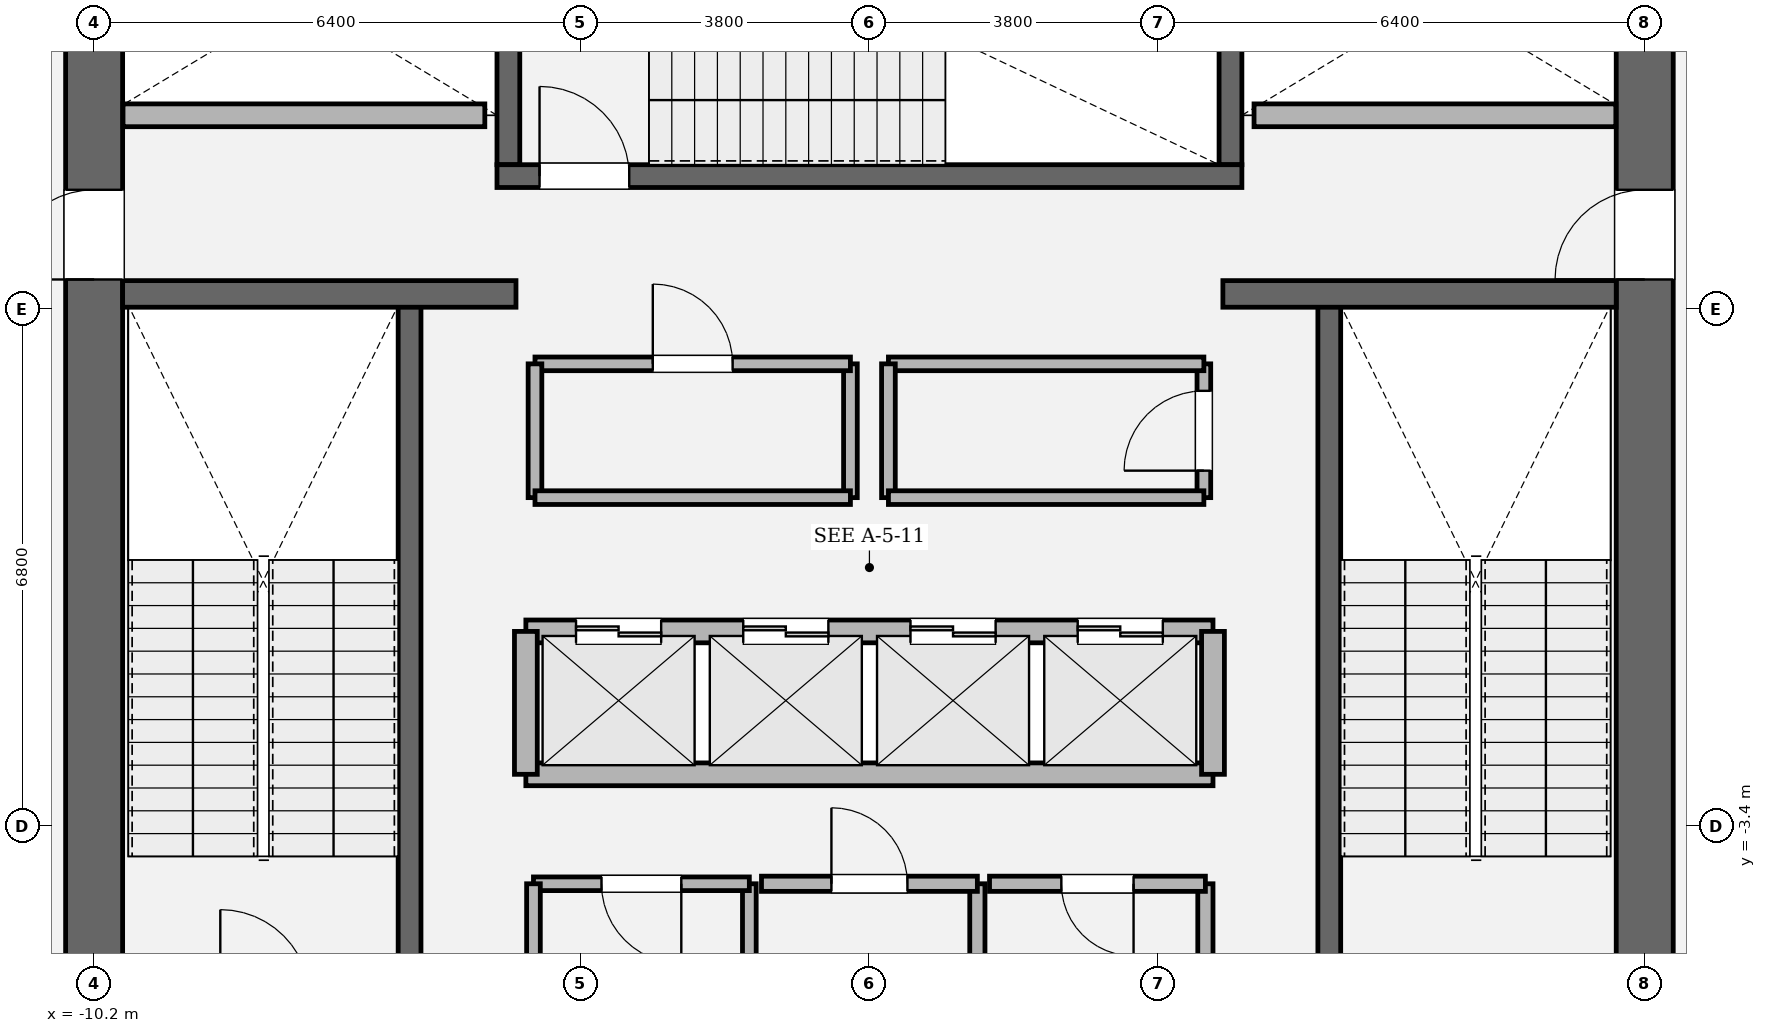
"""IFC4 building model, lengths in metres.
Left out: names, types, materials, properties, quantities, classifications, styles, units other than length and angle.
Written with IfcOpenShell. Run it as: python <this file> out.ifc"""

import sys

from ifc_helpers import new_model, si_unit, direction, frame, frame_2d, origin, place, context, subcontext, project, spatial, rectangle, extrude, element, fill, save


model = new_model("IFC4")
c1 = context("Model", 3, precision=1e-05, world=origin(), true_north=direction((0.0, 1.0)))
c2 = subcontext(c1, "Body", "Model", "MODEL_VIEW")
j1 = project(units=[si_unit("LENGTHUNIT", "METRE"), si_unit("PLANEANGLEUNIT", "RADIAN")], contexts=[c1])
p1 = place(None, origin())
s1 = spatial("IfcSite", under=j1, at=p1, CompositionType="ELEMENT")
p2 = place(p1, origin())
s2 = spatial("IfcBuilding", under=s1, at=p2, CompositionType="ELEMENT")
p3 = place(p2, frame((0.0, 0.0, 48.45)))
s3 = spatial("IfcBuildingStorey", under=s2, at=p3, CompositionType="ELEMENT", Elevation=48.45)
p4 = place(p3, frame((-10.2, -8.825, 0.0), z_axis=(0.0, 0.0, 1.0), x_axis=(0.0, 1.0, 0.0)))
e1 = element("IfcWall", 1, at=p4, inside=s3, PredefinedType="SHEAR", context=c2, shape_type="SweptSolid", body=[
    extrude(rectangle(XDim=17.65, YDim=0.75, at=frame_2d((8.825, 0.0))), origin(), (0.0, 0.0, 1.0), 4.05),
])
p5 = place(p4, frame((12.615, 0.0, 0.0)))
e2 = element("IfcOpeningElement", 2, at=p5, cuts=e1, PredefinedType="OPENING", context=c2, shape_type="SweptSolid", body=[
    extrude(rectangle(XDim=1.18, YDim=2.2, at=frame_2d((0.59, 1.1))), frame((0.0, 0.385, 0.0), z_axis=(0.0, -1.0, 0.0), x_axis=(1.0, 0.0, 0.0)), (0.0, 0.0, 1.0), 0.77),
])
p6 = place(p3, frame((10.2, 8.825, 0.0), z_axis=(0.0, 0.0, 1.0), x_axis=(0.0, -1.0, 0.0)))
e3 = element("IfcWall", 3, at=p6, inside=s3, PredefinedType="SHEAR", context=c2, shape_type="SweptSolid", body=[
    extrude(rectangle(XDim=17.65, YDim=0.75, at=frame_2d((8.825, 0.0))), origin(), (0.0, 0.0, 1.0), 4.05),
])
p7 = place(p6, frame((3.855, 0.0, 0.0)))
e4 = element("IfcOpeningElement", 4, at=p7, cuts=e3, PredefinedType="OPENING", context=c2, shape_type="SweptSolid", body=[
    extrude(rectangle(XDim=1.18, YDim=2.2, at=frame_2d((0.59, 1.1))), frame((0.0, 0.385, 0.0), z_axis=(0.0, -1.0, 0.0), x_axis=(1.0, 0.0, 0.0)), (0.0, 0.0, 1.0), 0.77),
])
for number, where, z_axis, x_axis in (
    (5, (-6.05, -5.5, 0.0), (0.0, 0.0, 1.0), (0.0, 1.0, 0.0)),
    (6, (6.05, 3.45, 0.0), (0.0, 0.0, 1.0), (0.0, -1.0, 0.0)),
):
    element("IfcWall", number, at=place(p3, frame(where, z_axis=z_axis, x_axis=x_axis)), inside=s3, PredefinedType="SOLIDWALL", context=c2, shape_type="SweptSolid", body=[
        extrude(rectangle(XDim=8.95, YDim=0.3, at=frame_2d((4.475, 0.0))), origin(), (0.0, 0.0, 1.0), 4.05),
    ])
for number, where, z_axis, x_axis in (
    (7, (-4.75, 5.3, 0.0), (0.0, 0.0, 1.0), (0.0, 1.0, 0.0)),
    (8, (4.75, 8.825, 0.0), (0.0, 0.0, 1.0), (0.0, -1.0, 0.0)),
):
    element("IfcWall", number, at=place(p3, frame(where, z_axis=z_axis, x_axis=x_axis)), inside=s3, PredefinedType="SOLIDWALL", context=c2, shape_type="SweptSolid", body=[
        extrude(rectangle(XDim=3.525, YDim=0.3, at=frame_2d((1.762, 0.0))), origin(), (0.0, 0.0, 1.0), 4.05),
    ])
p8 = place(p3, frame((-4.9, 5.15, 0.0), z_axis=(0.0, 0.0, 1.0), x_axis=(1.0, 0.0, 0.0)))
e9 = element("IfcWall", 9, at=p8, inside=s3, PredefinedType="SOLIDWALL", context=c2, shape_type="SweptSolid", body=[
    extrude(rectangle(XDim=9.8, YDim=0.3, at=frame_2d((4.9, 0.0))), origin(), (0.0, 0.0, 1.0), 4.05),
])
p9 = place(p8, frame((0.56, 0.0, 0.0)))
e10 = element("IfcOpeningElement", 10, at=p9, cuts=e9, PredefinedType="OPENING", context=c2, shape_type="SweptSolid", body=[
    extrude(rectangle(XDim=1.18, YDim=2.2, at=frame_2d((0.59, 1.1))), frame((0.0, 0.16, 0.0), z_axis=(0.0, -1.0, 0.0), x_axis=(1.0, 0.0, 0.0)), (0.0, 0.0, 1.0), 0.32),
])
for number, where, z_axis, x_axis in (
    (11, (-9.825, 3.6, 0.0), (0.0, 0.0, 1.0), (1.0, 0.0, 0.0)),
    (12, (4.65, 3.6, 0.0), (0.0, 0.0, 1.0), (1.0, 0.0, 0.0)),
):
    element("IfcWall", number, at=place(p3, frame(where, z_axis=z_axis, x_axis=x_axis)), inside=s3, PredefinedType="SOLIDWALL", context=c2, shape_type="SweptSolid", body=[
        extrude(rectangle(XDim=5.175, YDim=0.35, at=frame_2d((2.587, 0.0))), origin(), (0.0, 0.0, 1.0), 4.05),
    ])
p10 = place(p3, frame((-4.52, -0.84, 0.0), z_axis=(0.0, 0.0, 1.0), x_axis=(1.0, 0.0, 0.0)))
e13 = element("IfcWall", 13, at=p10, inside=s3, PredefinedType="SOLIDWALL", context=c2, shape_type="SweptSolid", body=[
    extrude(rectangle(XDim=9.04, YDim=0.3, at=frame_2d((4.52, 0.0))), origin(), (0.0, 0.0, 1.0), 3.81),
])
p11 = place(p10, frame((0.66, 0.0, 0.0)))
e14 = element("IfcOpeningElement", 14, at=p11, cuts=e13, PredefinedType="OPENING", context=c2, shape_type="SweptSolid", body=[
    extrude(rectangle(XDim=1.12, YDim=2.25, at=frame_2d((0.56, 1.125))), frame((0.0, 0.16, 0.0), z_axis=(0.0, -1.0, 0.0), x_axis=(1.0, 0.0, 0.0)), (0.0, 0.0, 1.0), 0.32),
])
p12 = place(p10, frame((2.86, 0.0, 0.0)))
e15 = element("IfcOpeningElement", 15, at=p12, cuts=e13, PredefinedType="OPENING", context=c2, shape_type="SweptSolid", body=[
    extrude(rectangle(XDim=1.12, YDim=2.25, at=frame_2d((0.56, 1.125))), frame((0.0, 0.16, 0.0), z_axis=(0.0, -1.0, 0.0), x_axis=(1.0, 0.0, 0.0)), (0.0, 0.0, 1.0), 0.32),
])
p13 = place(p10, frame((5.06, 0.0, 0.0)))
e16 = element("IfcOpeningElement", 16, at=p13, cuts=e13, PredefinedType="OPENING", context=c2, shape_type="SweptSolid", body=[
    extrude(rectangle(XDim=1.12, YDim=2.25, at=frame_2d((0.56, 1.125))), frame((0.0, 0.16, 0.0), z_axis=(0.0, -1.0, 0.0), x_axis=(1.0, 0.0, 0.0)), (0.0, 0.0, 1.0), 0.32),
])
p14 = place(p10, frame((7.26, 0.0, 0.0)))
e17 = element("IfcOpeningElement", 17, at=p14, cuts=e13, PredefinedType="OPENING", context=c2, shape_type="SweptSolid", body=[
    extrude(rectangle(XDim=1.12, YDim=2.25, at=frame_2d((0.56, 1.125))), frame((0.0, 0.16, 0.0), z_axis=(0.0, -1.0, 0.0), x_axis=(1.0, 0.0, 0.0)), (0.0, 0.0, 1.0), 0.32),
])
p15 = place(p3, frame((-4.52, -2.72, 0.0), z_axis=(0.0, 0.0, 1.0), x_axis=(1.0, 0.0, 0.0)))
e18 = element("IfcWall", 18, at=p15, inside=s3, PredefinedType="SOLIDWALL", context=c2, shape_type="SweptSolid", body=[
    extrude(rectangle(XDim=9.04, YDim=0.3, at=frame_2d((4.52, 0.0))), origin(), (0.0, 0.0, 1.0), 3.81),
])
for number, where, z_axis, x_axis in (
    (19, (-4.52, -2.72, 0.0), (0.0, 0.0, 1.0), (0.0, 1.0, 0.0)),
    (20, (4.52, -2.72, 0.0), (0.0, 0.0, 1.0), (0.0, 1.0, 0.0)),
):
    element("IfcWall", number, at=place(p3, frame(where, z_axis=z_axis, x_axis=x_axis)), inside=s3, PredefinedType="SOLIDWALL", context=c2, shape_type="SweptSolid", body=[
        extrude(rectangle(XDim=1.88, YDim=0.3, at=frame_2d((0.94, 0.0))), origin(), (0.0, 0.0, 1.0), 3.81),
    ])
for number, where, z_axis, x_axis in (
    (21, (-9.82, 5.95, 0.0), (0.0, 0.0, 1.0), (1.0, 0.0, 0.0)),
    (22, (5.06, 5.95, 0.0), (0.0, 0.0, 1.0), (1.0, 0.0, 0.0)),
):
    element("IfcWall", number, at=place(p3, frame(where, z_axis=z_axis, x_axis=x_axis)), inside=s3, PredefinedType="SOLIDWALL", context=c2, shape_type="SweptSolid", body=[
        extrude(rectangle(XDim=4.76, YDim=0.3, at=frame_2d((2.38, 0.0))), origin(), (0.0, 0.0, 1.0), 3.81),
    ])
p16 = place(p3, frame((-1.58, -5.9, 0.0), z_axis=(0.0, 0.0, 1.0), x_axis=(0.0, 1.0, 0.0)))
e23 = element("IfcWall", 23, at=p16, inside=s3, PredefinedType="PARTITIONING", context=c2, shape_type="SweptSolid", body=[
    extrude(rectangle(XDim=1.74, YDim=0.18, at=frame_2d((0.87, 0.0))), origin(), (0.0, 0.0, 1.0), 3.81),
])
p17 = place(p3, frame((-1.58, -4.16, 0.0), z_axis=(0.0, 0.0, 1.0), x_axis=(-1.0, 0.0, 0.0)))
e24 = element("IfcWall", 24, at=p17, inside=s3, PredefinedType="PARTITIONING", context=c2, shape_type="SweptSolid", body=[
    extrude(rectangle(XDim=2.84, YDim=0.18, at=frame_2d((1.42, 0.0))), origin(), (0.0, 0.0, 1.0), 3.81),
])
p18 = place(p17, frame((0.895, 0.0, 0.0)))
e25 = element("IfcOpeningElement", 25, at=p18, cuts=e24, PredefinedType="OPENING", context=c2, shape_type="SweptSolid", body=[
    extrude(rectangle(XDim=1.05, YDim=2.2, at=frame_2d((0.525, 1.1))), frame((0.0, 0.1, 0.0), z_axis=(0.0, -1.0, 0.0), x_axis=(1.0, 0.0, 0.0)), (0.0, 0.0, 1.0), 0.2),
])
p19 = place(p3, frame((-4.42, -4.16, 0.0), z_axis=(0.0, 0.0, 1.0), x_axis=(0.0, -1.0, 0.0)))
e26 = element("IfcWall", 26, at=p19, inside=s3, PredefinedType="PARTITIONING", context=c2, shape_type="SweptSolid", body=[
    extrude(rectangle(XDim=1.74, YDim=0.18, at=frame_2d((0.87, 0.0))), origin(), (0.0, 0.0, 1.0), 3.81),
])
p20 = place(p3, frame((1.42, -5.9, 0.0), z_axis=(0.0, 0.0, 1.0), x_axis=(0.0, 1.0, 0.0)))
e27 = element("IfcWall", 27, at=p20, inside=s3, PredefinedType="SOLIDWALL", context=c2, shape_type="SweptSolid", body=[
    extrude(rectangle(XDim=1.74, YDim=0.2, at=frame_2d((0.87, 0.0))), origin(), (0.0, 0.0, 1.0), 3.81),
])
p21 = place(p3, frame((1.42, -4.16, 0.0), z_axis=(0.0, 0.0, 1.0), x_axis=(-1.0, 0.0, 0.0)))
e28 = element("IfcWall", 28, at=p21, inside=s3, PredefinedType="SOLIDWALL", context=c2, shape_type="SweptSolid", body=[
    extrude(rectangle(XDim=2.84, YDim=0.2, at=frame_2d((1.42, 0.0))), origin(), (0.0, 0.0, 1.0), 3.81),
])
p22 = place(p21, frame((0.92, 0.0, 0.0)))
e29 = element("IfcOpeningElement", 29, at=p22, cuts=e28, PredefinedType="OPENING", context=c2, shape_type="SweptSolid", body=[
    extrude(rectangle(XDim=1.0, YDim=2.15, at=frame_2d((0.5, 1.075))), frame((0.0, 0.11, 0.0), z_axis=(0.0, -1.0, 0.0), x_axis=(1.0, 0.0, 0.0)), (0.0, 0.0, 1.0), 0.22),
])
p23 = place(p3, frame((4.42, -5.9, 0.0), z_axis=(0.0, 0.0, 1.0), x_axis=(0.0, 1.0, 0.0)))
e30 = element("IfcWall", 30, at=p23, inside=s3, PredefinedType="SOLIDWALL", context=c2, shape_type="SweptSolid", body=[
    extrude(rectangle(XDim=1.74, YDim=0.2, at=frame_2d((0.87, 0.0))), origin(), (0.0, 0.0, 1.0), 3.81),
])
p24 = place(p3, frame((4.42, -4.16, 0.0), z_axis=(0.0, 0.0, 1.0), x_axis=(-1.0, 0.0, 0.0)))
e31 = element("IfcWall", 31, at=p24, inside=s3, PredefinedType="SOLIDWALL", context=c2, shape_type="SweptSolid", body=[
    extrude(rectangle(XDim=2.84, YDim=0.2, at=frame_2d((1.42, 0.0))), origin(), (0.0, 0.0, 1.0), 3.81),
])
p25 = place(p24, frame((0.945, 0.0, 0.0)))
e32 = element("IfcOpeningElement", 32, at=p25, cuts=e31, PredefinedType="OPENING", context=c2, shape_type="SweptSolid", body=[
    extrude(rectangle(XDim=0.95, YDim=2.15, at=frame_2d((0.475, 1.075))), frame((0.0, 0.11, 0.0), z_axis=(0.0, -1.0, 0.0), x_axis=(1.0, 0.0, 0.0)), (0.0, 0.0, 1.0), 0.22),
])
p26 = place(p3, frame((-0.25, 0.92, 0.0), z_axis=(0.0, 0.0, 1.0), x_axis=(0.0, 1.0, 0.0)))
e33 = element("IfcWall", 33, at=p26, inside=s3, PredefinedType="PARTITIONING", context=c2, shape_type="SweptSolid", body=[
    extrude(rectangle(XDim=1.76, YDim=0.18, at=frame_2d((0.88, 0.0))), origin(), (0.0, 0.0, 1.0), 3.81),
])
p27 = place(p3, frame((-0.25, 2.68, 0.0), z_axis=(0.0, 0.0, 1.0), x_axis=(-1.0, 0.0, 0.0)))
e34 = element("IfcWall", 34, at=p27, inside=s3, PredefinedType="PARTITIONING", context=c2, shape_type="SweptSolid", body=[
    extrude(rectangle(XDim=4.15, YDim=0.18, at=frame_2d((2.075, 0.0))), origin(), (0.0, 0.0, 1.0), 3.81),
])
p28 = place(p27, frame((1.55, 0.0, 0.0)))
e35 = element("IfcOpeningElement", 35, at=p28, cuts=e34, PredefinedType="OPENING", context=c2, shape_type="SweptSolid", body=[
    extrude(rectangle(XDim=1.05, YDim=2.2, at=frame_2d((0.525, 1.1))), frame((0.0, 0.1, 0.0), z_axis=(0.0, -1.0, 0.0), x_axis=(1.0, 0.0, 0.0)), (0.0, 0.0, 1.0), 0.2),
])
p29 = place(p3, frame((-4.4, 2.68, 0.0), z_axis=(0.0, 0.0, 1.0), x_axis=(0.0, -1.0, 0.0)))
e36 = element("IfcWall", 36, at=p29, inside=s3, PredefinedType="PARTITIONING", context=c2, shape_type="SweptSolid", body=[
    extrude(rectangle(XDim=1.76, YDim=0.18, at=frame_2d((0.88, 0.0))), origin(), (0.0, 0.0, 1.0), 3.81),
])
p30 = place(p3, frame((-4.4, 0.92, 0.0), z_axis=(0.0, 0.0, 1.0), x_axis=(1.0, 0.0, 0.0)))
e37 = element("IfcWall", 37, at=p30, inside=s3, PredefinedType="PARTITIONING", context=c2, shape_type="SweptSolid", body=[
    extrude(rectangle(XDim=4.15, YDim=0.18, at=frame_2d((2.075, 0.0))), origin(), (0.0, 0.0, 1.0), 3.81),
])
p31 = place(p3, frame((4.4, 0.92, 0.0), z_axis=(0.0, 0.0, 1.0), x_axis=(0.0, 1.0, 0.0)))
e38 = element("IfcWall", 38, at=p31, inside=s3, PredefinedType="PARTITIONING", context=c2, shape_type="SweptSolid", body=[
    extrude(rectangle(XDim=1.76, YDim=0.18, at=frame_2d((0.88, 0.0))), origin(), (0.0, 0.0, 1.0), 3.81),
])
p32 = place(p31, frame((0.355, 0.0, 0.0)))
e39 = element("IfcOpeningElement", 39, at=p32, cuts=e38, PredefinedType="OPENING", context=c2, shape_type="SweptSolid", body=[
    extrude(rectangle(XDim=1.05, YDim=2.2, at=frame_2d((0.525, 1.1))), frame((0.0, 0.1, 0.0), z_axis=(0.0, -1.0, 0.0), x_axis=(1.0, 0.0, 0.0)), (0.0, 0.0, 1.0), 0.2),
])
p33 = place(p3, frame((4.4, 2.68, 0.0), z_axis=(0.0, 0.0, 1.0), x_axis=(-1.0, 0.0, 0.0)))
e40 = element("IfcWall", 40, at=p33, inside=s3, PredefinedType="PARTITIONING", context=c2, shape_type="SweptSolid", body=[
    extrude(rectangle(XDim=4.15, YDim=0.18, at=frame_2d((2.075, 0.0))), origin(), (0.0, 0.0, 1.0), 3.81),
])
p34 = place(p3, frame((0.25, 2.68, 0.0), z_axis=(0.0, 0.0, 1.0), x_axis=(0.0, -1.0, 0.0)))
e41 = element("IfcWall", 41, at=p34, inside=s3, PredefinedType="PARTITIONING", context=c2, shape_type="SweptSolid", body=[
    extrude(rectangle(XDim=1.76, YDim=0.18, at=frame_2d((0.88, 0.0))), origin(), (0.0, 0.0, 1.0), 3.81),
])
p35 = place(p3, frame((0.25, 0.92, 0.0), z_axis=(0.0, 0.0, 1.0), x_axis=(1.0, 0.0, 0.0)))
e42 = element("IfcWall", 42, at=p35, inside=s3, PredefinedType="PARTITIONING", context=c2, shape_type="SweptSolid", body=[
    extrude(rectangle(XDim=4.15, YDim=0.18, at=frame_2d((2.075, 0.0))), origin(), (0.0, 0.0, 1.0), 3.81),
])
p36 = place(p9, origin())
e43 = element("IfcDoor", 43, at=p36, inside=s3, OperationType="SINGLE_SWING_LEFT", PredefinedType="DOOR", context=c2, shape_type="SweptSolid", body=[
    extrude(rectangle(XDim=1.18, YDim=2.2, at=frame_2d((0.59, 1.1))), frame((0.0, 0.025, 0.0), z_axis=(0.0, -1.0, 0.0), x_axis=(1.0, 0.0, 0.0)), (0.0, 0.0, 1.0), 0.05),
])
fill(e10, e43)
p37 = place(p5, origin())
e44 = element("IfcDoor", 44, at=p37, inside=s3, OperationType="SINGLE_SWING_LEFT", PredefinedType="DOOR", context=c2, shape_type="SweptSolid", body=[
    extrude(rectangle(XDim=1.18, YDim=2.2, at=frame_2d((0.59, 1.1))), frame((0.0, 0.025, 0.0), z_axis=(0.0, -1.0, 0.0), x_axis=(1.0, 0.0, 0.0)), (0.0, 0.0, 1.0), 0.05),
])
fill(e2, e44)
p38 = place(p7, origin())
e45 = element("IfcDoor", 45, at=p38, inside=s3, OperationType="SINGLE_SWING_RIGHT", PredefinedType="DOOR", context=c2, shape_type="SweptSolid", body=[
    extrude(rectangle(XDim=1.18, YDim=2.2, at=frame_2d((0.59, 1.1))), frame((0.0, 0.025, 0.0), z_axis=(0.0, -1.0, 0.0), x_axis=(1.0, 0.0, 0.0)), (0.0, 0.0, 1.0), 0.05),
])
fill(e4, e45)
p39 = place(p11, origin())
e46 = element("IfcDoor", 46, at=p39, inside=s3, OperationType="DOUBLE_DOOR_SLIDING", PredefinedType="DOOR", context=c2, shape_type="SweptSolid", body=[
    extrude(rectangle(XDim=1.12, YDim=2.25, at=frame_2d((0.56, 1.125))), frame((0.0, 0.025, 0.0), z_axis=(0.0, -1.0, 0.0), x_axis=(1.0, 0.0, 0.0)), (0.0, 0.0, 1.0), 0.05),
])
fill(e14, e46)
p40 = place(p12, origin())
e47 = element("IfcDoor", 47, at=p40, inside=s3, OperationType="DOUBLE_DOOR_SLIDING", PredefinedType="DOOR", context=c2, shape_type="SweptSolid", body=[
    extrude(rectangle(XDim=1.12, YDim=2.25, at=frame_2d((0.56, 1.125))), frame((0.0, 0.025, 0.0), z_axis=(0.0, -1.0, 0.0), x_axis=(1.0, 0.0, 0.0)), (0.0, 0.0, 1.0), 0.05),
])
fill(e15, e47)
p41 = place(p13, origin())
e48 = element("IfcDoor", 48, at=p41, inside=s3, OperationType="DOUBLE_DOOR_SLIDING", PredefinedType="DOOR", context=c2, shape_type="SweptSolid", body=[
    extrude(rectangle(XDim=1.12, YDim=2.25, at=frame_2d((0.56, 1.125))), frame((0.0, 0.025, 0.0), z_axis=(0.0, -1.0, 0.0), x_axis=(1.0, 0.0, 0.0)), (0.0, 0.0, 1.0), 0.05),
])
fill(e16, e48)
p42 = place(p14, origin())
e49 = element("IfcDoor", 49, at=p42, inside=s3, OperationType="DOUBLE_DOOR_SLIDING", PredefinedType="DOOR", context=c2, shape_type="SweptSolid", body=[
    extrude(rectangle(XDim=1.12, YDim=2.25, at=frame_2d((0.56, 1.125))), frame((0.0, 0.025, 0.0), z_axis=(0.0, -1.0, 0.0), x_axis=(1.0, 0.0, 0.0)), (0.0, 0.0, 1.0), 0.05),
])
fill(e17, e49)
p43 = place(p18, origin())
e50 = element("IfcDoor", 50, at=p43, inside=s3, OperationType="SINGLE_SWING_LEFT", PredefinedType="DOOR", context=c2, shape_type="SweptSolid", body=[
    extrude(rectangle(XDim=1.05, YDim=2.2, at=frame_2d((0.525, 1.1))), frame((0.0, 0.025, 0.0), z_axis=(0.0, -1.0, 0.0), x_axis=(1.0, 0.0, 0.0)), (0.0, 0.0, 1.0), 0.05),
])
fill(e25, e50)
p44 = place(p22, origin())
e51 = element("IfcDoor", 51, at=p44, inside=s3, OperationType="SINGLE_SWING_RIGHT", PredefinedType="DOOR", context=c2, shape_type="SweptSolid", body=[
    extrude(rectangle(XDim=1.0, YDim=2.15, at=frame_2d((0.5, 1.075))), frame((0.0, 0.025, 0.0), z_axis=(0.0, -1.0, 0.0), x_axis=(1.0, 0.0, 0.0)), (0.0, 0.0, 1.0), 0.05),
])
fill(e29, e51)
p45 = place(p25, origin())
e52 = element("IfcDoor", 52, at=p45, inside=s3, OperationType="SINGLE_SWING_LEFT", PredefinedType="DOOR", context=c2, shape_type="SweptSolid", body=[
    extrude(rectangle(XDim=0.95, YDim=2.15, at=frame_2d((0.475, 1.075))), frame((0.0, 0.025, 0.0), z_axis=(0.0, -1.0, 0.0), x_axis=(1.0, 0.0, 0.0)), (0.0, 0.0, 1.0), 0.05),
])
fill(e32, e52)
p46 = place(p28, origin())
e53 = element("IfcDoor", 53, at=p46, inside=s3, OperationType="SINGLE_SWING_RIGHT", PredefinedType="DOOR", context=c2, shape_type="SweptSolid", body=[
    extrude(rectangle(XDim=1.05, YDim=2.2, at=frame_2d((0.525, 1.1))), frame((0.0, 0.025, 0.0), z_axis=(0.0, -1.0, 0.0), x_axis=(1.0, 0.0, 0.0)), (0.0, 0.0, 1.0), 0.05),
])
fill(e35, e53)
p47 = place(p32, origin())
e54 = element("IfcDoor", 54, at=p47, inside=s3, OperationType="SINGLE_SWING_LEFT", PredefinedType="DOOR", context=c2, shape_type="SweptSolid", body=[
    extrude(rectangle(XDim=1.05, YDim=2.2, at=frame_2d((0.525, 1.1))), frame((0.0, 0.025, 0.0), z_axis=(0.0, -1.0, 0.0), x_axis=(1.0, 0.0, 0.0)), (0.0, 0.0, 1.0), 0.05),
])
fill(e39, e54)
save(model, sys.argv[1])
